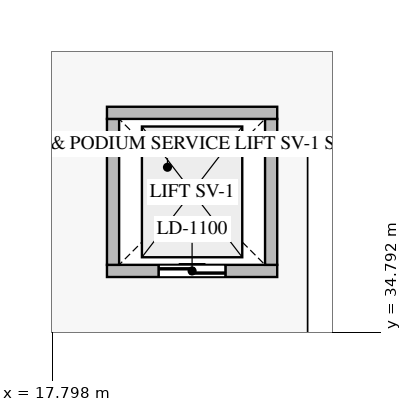
"""IFC4 building model, lengths in metres.
Left out: names, types, materials, properties, quantities, classifications, styles, units other than length and angle.
Written with IfcOpenShell. Run it as: python <this file> out.ifc"""

import sys

from ifc_helpers import new_model, si_unit, direction, frame, frame_2d, origin, place, context, subcontext, project, spatial, rectangle, extrude, source, transform, mapped, element, fill, save


model = new_model("IFC4")
c1 = context("Model", 3, precision=1e-05, world=origin(), true_north=direction((0.0, 1.0)))
c2 = subcontext(c1, "Body", "Model", "MODEL_VIEW")
j1 = project(units=[si_unit("LENGTHUNIT", "METRE"), si_unit("PLANEANGLEUNIT", "RADIAN")], contexts=[c1])
p1 = place(None, origin())
s1 = spatial("IfcSite", under=j1, at=p1, CompositionType="ELEMENT")
p2 = place(p1, origin())
s2 = spatial("IfcBuilding", under=s1, at=p2, CompositionType="ELEMENT")
p3 = place(p2, frame((0.0, 0.0, -3.6)))
s3 = spatial("IfcBuildingStorey", under=s2, at=p3, CompositionType="ELEMENT", Elevation=-3.6)
p4 = place(p3, frame((18.7, 35.8, 0.0), z_axis=(0.0, 0.0, 1.0), x_axis=(1.0, 0.0, 0.0)))
e1 = element("IfcWall", 1, at=p4, inside=s3, PredefinedType="STANDARD", context=c2, shape_type="SweptSolid", body=[
    extrude(rectangle(XDim=2.8, YDim=0.2, at=frame_2d((1.4, 0.0))), origin(), (0.0, 0.0, 1.0), 3.22),
])
p5 = place(p4, frame((0.85, 0.0, 0.0)))
e2 = element("IfcOpeningElement", 2, at=p5, cuts=e1, PredefinedType="OPENING", context=c2, shape_type="SweptSolid", body=[
    extrude(rectangle(XDim=1.1, YDim=2.2, at=frame_2d((0.55, 1.1))), frame((0.0, 0.11, 0.0), z_axis=(0.0, -1.0, 0.0), x_axis=(1.0, 0.0, 0.0)), (0.0, 0.0, 1.0), 0.22),
])
for number, where, z_axis, x_axis in (
    (3, (18.8, 35.9, 0.0), (0.0, 0.0, 1.0), (0.0, 1.0, 0.0)),
    (4, (21.4, 35.9, 0.0), (0.0, 0.0, 1.0), (0.0, 1.0, 0.0)),
):
    element("IfcWall", number, at=place(p3, frame(where, z_axis=z_axis, x_axis=x_axis)), inside=s3, PredefinedType="STANDARD", context=c2, shape_type="SweptSolid", body=[
        extrude(rectangle(XDim=2.4, YDim=0.2, at=frame_2d((1.2, 0.0))), origin(), (0.0, 0.0, 1.0), 3.22),
    ])
p6 = place(p3, frame((18.7, 38.4, 0.0), z_axis=(0.0, 0.0, 1.0), x_axis=(1.0, 0.0, 0.0)))
e5 = element("IfcWall", 5, at=p6, inside=s3, PredefinedType="STANDARD", context=c2, shape_type="SweptSolid", body=[
    extrude(rectangle(XDim=2.8, YDim=0.2, at=frame_2d((1.4, 0.0))), origin(), (0.0, 0.0, 1.0), 3.22),
])
m1 = source(origin(), c2, "Body", "SweptSolid", [
    extrude(rectangle(XDim=1.1, YDim=2.2, at=frame_2d((0.55, 1.1))), frame((0.0, 0.025, 0.0), z_axis=(0.0, -1.0, 0.0), x_axis=(1.0, 0.0, 0.0)), (0.0, 0.0, 1.0), 0.05),
])
p7 = place(p5, origin())
e6 = element("IfcDoor", 6, at=p7, inside=s3, OperationType="DOUBLE_DOOR_SLIDING", PredefinedType="DOOR", context=c2, shape_type="MappedRepresentation", body=[
    mapped(m1, transform((0.0, 0.0, 0.0), scale=1.0)),
])
fill(e2, e6)
save(model, sys.argv[1])
